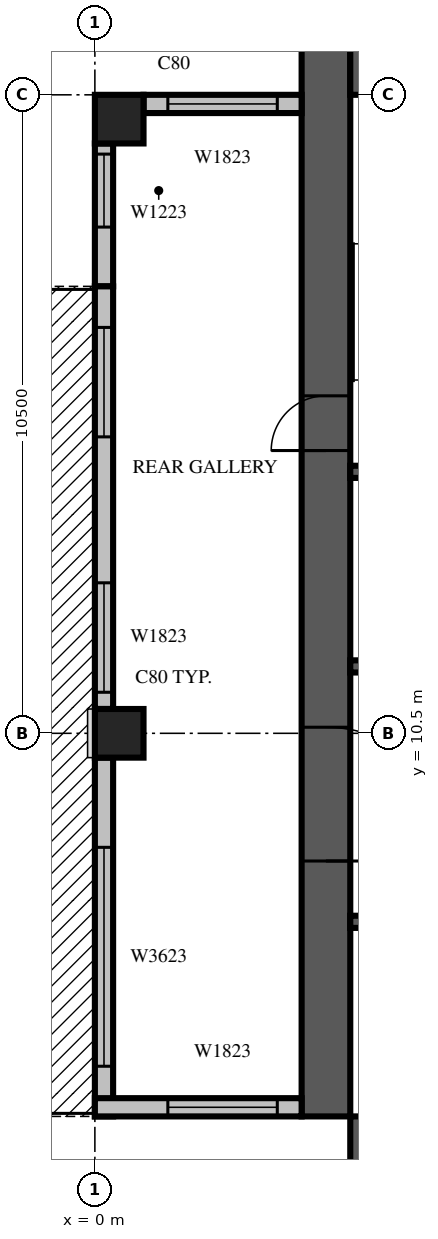
"""IFC4 building model, lengths in metres.
Left out: names, types, materials, properties, quantities, classifications, styles, units other than length and angle.
Written with IfcOpenShell. Run it as: python <this file> out.ifc"""

import sys

from ifc_helpers import new_model, si_unit, direction, frame, frame_2d, origin, origin_2d, place, context, subcontext, project, spatial, rectangle, extrude, source, transform, mapped, element, fill, save


model = new_model("IFC4")
c1 = context("Model", 3, precision=1e-05, world=origin(), true_north=direction((0.0, 1.0)))
c2 = subcontext(c1, "Body", "Model", "MODEL_VIEW")
j1 = project(units=[si_unit("LENGTHUNIT", "METRE"), si_unit("PLANEANGLEUNIT", "RADIAN")], contexts=[c1])
p1 = place(None, origin())
s1 = spatial("IfcSite", under=j1, at=p1, CompositionType="ELEMENT")
p2 = place(p1, origin())
s2 = spatial("IfcBuilding", under=s1, at=p2, CompositionType="ELEMENT")
p3 = place(p2, frame((0.0, 0.0, 231.0)))
s3 = spatial("IfcBuildingStorey", under=s2, at=p3, CompositionType="ELEMENT", Elevation=231.0)
m1 = source(origin(), c2, "Body", "SweptSolid", [
    extrude(rectangle(XDim=0.8, YDim=0.8, at=origin_2d()), origin(), (0.0, 0.0, 1.0), 3.8),
])
for number, where, z_axis, x_axis in (
    (1, (0.4, 10.5, 0.0), (0.0, 0.0, 1.0), (1.0, 0.0, 0.0)),
    (2, (0.4, 20.6, 0.0), (0.0, 0.0, 1.0), (1.0, 0.0, 0.0)),
):
    element("IfcColumn", number, at=place(p3, frame(where, z_axis=z_axis, x_axis=x_axis)), inside=s3, PredefinedType="COLUMN", context=c2, shape_type="MappedRepresentation", body=[
        mapped(m1, transform((0.0, 0.0, 0.0), scale=1.0)),
    ])
m2 = source(origin(), c2, "Body", "SweptSolid", [
    extrude(rectangle(XDim=17.6, YDim=0.8, at=frame_2d((8.8, 0.0))), origin(), (0.0, 0.0, 1.0), 3.8),
])
p4 = place(p3, frame((3.8, 4.2, 0.0), z_axis=(0.0, 0.0, 1.0), x_axis=(0.0, 1.0, 0.0)))
e3 = element("IfcWall", 3, at=p4, inside=s3, PredefinedType="SHEAR", context=c2, shape_type="MappedRepresentation", body=[
    mapped(m2, transform((0.0, 0.0, 0.0), scale=1.0)),
])
m3 = source(origin(), c2, "Body", "SweptSolid", [
    extrude(rectangle(XDim=2.2, YDim=2.1, at=frame_2d((1.1, 1.05))), frame((0.0, 0.41, 0.0), z_axis=(0.0, -1.0, 0.0), x_axis=(1.0, 0.0, 0.0)), (0.0, 0.0, 1.0), 0.82),
])
p5 = place(p4, frame((4.2, 0.0, 0.0)))
e4 = element("IfcOpeningElement", 4, at=p5, cuts=e3, PredefinedType="OPENING", context=c2, shape_type="MappedRepresentation", body=[
    mapped(m3, transform((0.0, 0.0, 0.0), scale=1.0)),
])
m4 = source(origin(), c2, "Body", "SweptSolid", [
    extrude(rectangle(XDim=0.9, YDim=2.1, at=frame_2d((0.45, 1.05))), frame((0.0, 0.41, 0.0), z_axis=(0.0, -1.0, 0.0), x_axis=(1.0, 0.0, 0.0)), (0.0, 0.0, 1.0), 0.82),
])
p6 = place(p4, frame((10.95, 0.0, 0.0)))
e5 = element("IfcOpeningElement", 5, at=p6, cuts=e3, PredefinedType="OPENING", context=c2, shape_type="MappedRepresentation", body=[
    mapped(m4, transform((0.0, 0.0, 0.0), scale=1.0)),
])
p7 = place(p3, frame((4.2, 3.8, 0.0), z_axis=(0.0, 0.0, 1.0), x_axis=(1.0, 0.0, 0.0)))
e6 = element("IfcWall", 6, at=p7, inside=s3, PredefinedType="SHEAR", context=c2, shape_type="MappedRepresentation", body=[
    mapped(m2, transform((0.0, 0.0, 0.0), scale=1.0)),
])
p8 = place(p7, frame((11.55, 0.0, 0.0)))
e7 = element("IfcOpeningElement", 7, at=p8, cuts=e6, PredefinedType="OPENING", context=c2, shape_type="MappedRepresentation", body=[
    mapped(m4, transform((0.0, 0.0, 0.0), scale=1.0)),
])
m5 = source(origin(), c2, "Body", "SweptSolid", [
    extrude(rectangle(XDim=16.8, YDim=0.8, at=frame_2d((8.4, 0.0))), origin(), (0.0, 0.0, 1.0), 3.8),
])
p9 = place(p3, frame((4.2, 21.4, 0.0), z_axis=(0.0, 0.0, 1.0), x_axis=(1.0, 0.0, 0.0)))
e8 = element("IfcWall", 8, at=p9, inside=s3, PredefinedType="SHEAR", context=c2, shape_type="MappedRepresentation", body=[
    mapped(m5, transform((0.0, 0.0, 0.0), scale=1.0)),
])
m6 = source(origin(), c2, "Body", "SweptSolid", [
    extrude(rectangle(XDim=1.2, YDim=2.1, at=frame_2d((0.6, 1.05))), frame((0.0, 0.41, 0.0), z_axis=(0.0, -1.0, 0.0), x_axis=(1.0, 0.0, 0.0)), (0.0, 0.0, 1.0), 0.82),
])
p10 = place(p9, frame((7.4, 0.0, 0.0)))
e9 = element("IfcOpeningElement", 9, at=p10, cuts=e8, PredefinedType="OPENING", context=c2, shape_type="MappedRepresentation", body=[
    mapped(m6, transform((0.0, 0.0, 0.0), scale=1.0)),
])
m7 = source(origin(), c2, "Body", "SweptSolid", [
    extrude(rectangle(XDim=2.6, YDim=0.3, at=frame_2d((1.3, 0.0))), origin(), (0.0, 0.0, 1.0), 3.4),
])
p11 = place(p3, frame((3.4, 20.85, 0.0), z_axis=(0.0, 0.0, 1.0), x_axis=(-1.0, 0.0, 0.0)))
e10 = element("IfcWall", 10, at=p11, inside=s3, PredefinedType="STANDARD", context=c2, shape_type="MappedRepresentation", body=[
    mapped(m7, transform((0.0, 0.0, 0.0), scale=1.0)),
])
m8 = source(origin(), c2, "Body", "SweptSolid", [
    extrude(rectangle(XDim=1.8, YDim=2.3, at=frame_2d((0.9, 1.15))), frame((0.0, 0.16, 0.0), z_axis=(0.0, -1.0, 0.0), x_axis=(1.0, 0.0, 0.0)), (0.0, 0.0, 1.0), 0.32),
])
p12 = place(p11, frame((0.4, 0.0, 0.6)))
e11 = element("IfcOpeningElement", 11, at=p12, cuts=e10, PredefinedType="OPENING", context=c2, shape_type="MappedRepresentation", body=[
    mapped(m8, transform((0.0, 0.0, 0.0), scale=1.0)),
])
p13 = place(p3, frame((0.15, 20.2, 0.0), z_axis=(0.0, 0.0, 1.0), x_axis=(0.0, -1.0, 0.0)))
e12 = element("IfcWall", 12, at=p13, inside=s3, PredefinedType="STANDARD", context=c2, shape_type="SweptSolid", body=[
    extrude(rectangle(XDim=2.35, YDim=0.3, at=frame_2d((1.175, 0.0))), origin(), (0.0, 0.0, 1.0), 3.4),
])
m9 = source(origin(), c2, "Body", "SweptSolid", [
    extrude(rectangle(XDim=1.2, YDim=2.3, at=frame_2d((0.6, 1.15))), frame((0.0, 0.16, 0.0), z_axis=(0.0, -1.0, 0.0), x_axis=(1.0, 0.0, 0.0)), (0.0, 0.0, 1.0), 0.32),
])
p14 = place(p13, frame((0.175, 0.0, 0.6)))
e13 = element("IfcOpeningElement", 13, at=p14, cuts=e12, PredefinedType="OPENING", context=c2, shape_type="MappedRepresentation", body=[
    mapped(m9, transform((0.0, 0.0, 0.0), scale=1.0)),
])
p15 = place(p3, frame((0.15, 17.85, 0.0), z_axis=(0.0, 0.0, 1.0), x_axis=(0.0, -1.0, 0.0)))
e14 = element("IfcWall", 14, at=p15, inside=s3, PredefinedType="STANDARD", context=c2, shape_type="SweptSolid", body=[
    extrude(rectangle(XDim=6.95, YDim=0.3, at=frame_2d((3.475, 0.0))), origin(), (0.0, 0.0, 1.0), 3.4),
])
m10 = source(origin(), c2, "Body", "SweptSolid", [
    extrude(rectangle(XDim=1.8, YDim=2.4, at=frame_2d((0.9, 1.2))), frame((0.0, 0.16, 0.0), z_axis=(0.0, -1.0, 0.0), x_axis=(1.0, 0.0, 0.0)), (0.0, 0.0, 1.0), 0.32),
])
p16 = place(p15, frame((0.675, 0.0, 0.0)))
e15 = element("IfcOpeningElement", 15, at=p16, cuts=e14, PredefinedType="OPENING", context=c2, shape_type="MappedRepresentation", body=[
    mapped(m10, transform((0.0, 0.0, 0.0), scale=1.0)),
])
p17 = place(p15, frame((4.875, 0.0, 0.6)))
e16 = element("IfcOpeningElement", 16, at=p17, cuts=e14, PredefinedType="OPENING", context=c2, shape_type="MappedRepresentation", body=[
    mapped(m8, transform((0.0, 0.0, 0.0), scale=1.0)),
])
m11 = source(origin(), c2, "Body", "SweptSolid", [
    extrude(rectangle(XDim=5.9, YDim=0.3, at=frame_2d((2.95, 0.0))), origin(), (0.0, 0.0, 1.0), 3.4),
])
p18 = place(p3, frame((0.15, 10.1, 0.0), z_axis=(0.0, 0.0, 1.0), x_axis=(0.0, -1.0, 0.0)))
e17 = element("IfcWall", 17, at=p18, inside=s3, PredefinedType="STANDARD", context=c2, shape_type="MappedRepresentation", body=[
    mapped(m11, transform((0.0, 0.0, 0.0), scale=1.0)),
])
m12 = source(origin(), c2, "Body", "SweptSolid", [
    extrude(rectangle(XDim=3.6, YDim=2.3, at=frame_2d((1.8, 1.15))), frame((0.0, 0.16, 0.0), z_axis=(0.0, -1.0, 0.0), x_axis=(1.0, 0.0, 0.0)), (0.0, 0.0, 1.0), 0.32),
])
p19 = place(p18, frame((1.475, 0.0, 0.6)))
e18 = element("IfcOpeningElement", 18, at=p19, cuts=e17, PredefinedType="OPENING", context=c2, shape_type="MappedRepresentation", body=[
    mapped(m12, transform((0.0, 0.0, 0.0), scale=1.0)),
])
m13 = source(origin(), c2, "Body", "SweptSolid", [
    extrude(rectangle(XDim=3.4, YDim=0.3, at=frame_2d((1.7, 0.0))), origin(), (0.0, 0.0, 1.0), 3.4),
])
p20 = place(p3, frame((0.0, 4.35, 0.0), z_axis=(0.0, 0.0, 1.0), x_axis=(1.0, 0.0, 0.0)))
e19 = element("IfcWall", 19, at=p20, inside=s3, PredefinedType="STANDARD", context=c2, shape_type="MappedRepresentation", body=[
    mapped(m13, transform((0.0, 0.0, 0.0), scale=1.0)),
])
p21 = place(p20, frame((1.2, 0.0, 0.6)))
e20 = element("IfcOpeningElement", 20, at=p21, cuts=e19, PredefinedType="OPENING", context=c2, shape_type="MappedRepresentation", body=[
    mapped(m8, transform((0.0, 0.0, 0.0), scale=1.0)),
])
m14 = source(origin(), c2, "Body", "SweptSolid", [
    extrude(rectangle(XDim=9.6, YDim=0.2, at=frame_2d((4.8, 0.0))), origin(), (0.0, 0.0, 1.0), 3.8),
])
p22 = place(p3, frame((4.2, 7.4, 0.0), z_axis=(0.0, 0.0, 1.0), x_axis=(1.0, 0.0, 0.0)))
e21 = element("IfcWall", 21, at=p22, inside=s3, PredefinedType="SOLIDWALL", context=c2, shape_type="MappedRepresentation", body=[
    mapped(m14, transform((0.0, 0.0, 0.0), scale=1.0)),
])
m15 = source(origin(), c2, "Body", "SweptSolid", [
    extrude(rectangle(XDim=1.1, YDim=2.1, at=frame_2d((0.55, 1.05))), frame((0.0, 0.11, 0.0), z_axis=(0.0, -1.0, 0.0), x_axis=(1.0, 0.0, 0.0)), (0.0, 0.0, 1.0), 0.22),
])
p23 = place(p22, frame((0.65, 0.0, 0.0)))
e22 = element("IfcOpeningElement", 22, at=p23, cuts=e21, PredefinedType="OPENING", context=c2, shape_type="MappedRepresentation", body=[
    mapped(m15, transform((0.0, 0.0, 0.0), scale=1.0)),
])
p24 = place(p22, frame((3.05, 0.0, 0.0)))
e23 = element("IfcOpeningElement", 23, at=p24, cuts=e21, PredefinedType="OPENING", context=c2, shape_type="MappedRepresentation", body=[
    mapped(m15, transform((0.0, 0.0, 0.0), scale=1.0)),
])
p25 = place(p22, frame((5.45, 0.0, 0.0)))
e24 = element("IfcOpeningElement", 24, at=p25, cuts=e21, PredefinedType="OPENING", context=c2, shape_type="MappedRepresentation", body=[
    mapped(m15, transform((0.0, 0.0, 0.0), scale=1.0)),
])
p26 = place(p22, frame((7.85, 0.0, 0.0)))
e25 = element("IfcOpeningElement", 25, at=p26, cuts=e21, PredefinedType="OPENING", context=c2, shape_type="MappedRepresentation", body=[
    mapped(m15, transform((0.0, 0.0, 0.0), scale=1.0)),
])
m16 = source(origin(), c2, "Body", "SweptSolid", [
    extrude(rectangle(XDim=4.8, YDim=0.2, at=frame_2d((2.4, 0.0))), origin(), (0.0, 0.0, 1.0), 3.8),
])
p27 = place(p3, frame((4.2, 11.6, 0.0), z_axis=(0.0, 0.0, 1.0), x_axis=(1.0, 0.0, 0.0)))
e26 = element("IfcWall", 26, at=p27, inside=s3, PredefinedType="SOLIDWALL", context=c2, shape_type="MappedRepresentation", body=[
    mapped(m16, transform((0.0, 0.0, 0.0), scale=1.0)),
])
p28 = place(p27, frame((0.65, 0.0, 0.0)))
e27 = element("IfcOpeningElement", 27, at=p28, cuts=e26, PredefinedType="OPENING", context=c2, shape_type="MappedRepresentation", body=[
    mapped(m15, transform((0.0, 0.0, 0.0), scale=1.0)),
])
p29 = place(p27, frame((3.05, 0.0, 0.0)))
e28 = element("IfcOpeningElement", 28, at=p29, cuts=e26, PredefinedType="OPENING", context=c2, shape_type="MappedRepresentation", body=[
    mapped(m15, transform((0.0, 0.0, 0.0), scale=1.0)),
])
p30 = place(p3, frame((4.2, 14.8, 0.0), z_axis=(0.0, 0.0, 1.0), x_axis=(1.0, 0.0, 0.0)))
e29 = element("IfcWall", 29, at=p30, inside=s3, PredefinedType="SOLIDWALL", context=c2, shape_type="MappedRepresentation", body=[
    mapped(m16, transform((0.0, 0.0, 0.0), scale=1.0)),
])
m17 = source(origin(), c2, "Body", "SweptSolid", [
    extrude(rectangle(XDim=1.8, YDim=2.3, at=frame_2d((0.9, 1.15))), frame((0.0, 0.03, 0.0), z_axis=(0.0, -1.0, 0.0), x_axis=(1.0, 0.0, 0.0)), (0.0, 0.0, 1.0), 0.06),
])
p31 = place(p12, origin())
e30 = element("IfcWindow", 30, at=p31, inside=s3, PartitioningType="SINGLE_PANEL", PredefinedType="WINDOW", context=c2, shape_type="MappedRepresentation", body=[
    mapped(m17, transform((0.0, 0.0, 0.0), scale=1.0)),
])
fill(e11, e30)
m18 = source(origin(), c2, "Body", "SweptSolid", [
    extrude(rectangle(XDim=1.2, YDim=2.3, at=frame_2d((0.6, 1.15))), frame((0.0, 0.03, 0.0), z_axis=(0.0, -1.0, 0.0), x_axis=(1.0, 0.0, 0.0)), (0.0, 0.0, 1.0), 0.06),
])
p32 = place(p14, origin())
e31 = element("IfcWindow", 31, at=p32, inside=s3, PartitioningType="SINGLE_PANEL", PredefinedType="WINDOW", context=c2, shape_type="MappedRepresentation", body=[
    mapped(m18, transform((0.0, 0.0, 0.0), scale=1.0)),
])
fill(e13, e31)
m19 = source(origin(), c2, "Body", "SweptSolid", [
    extrude(rectangle(XDim=1.8, YDim=2.4, at=frame_2d((0.9, 1.2))), frame((0.0, 0.025, 0.0), z_axis=(0.0, -1.0, 0.0), x_axis=(1.0, 0.0, 0.0)), (0.0, 0.0, 1.0), 0.05),
])
p33 = place(p16, origin())
e32 = element("IfcDoor", 32, at=p33, inside=s3, OperationType="SLIDING_TO_LEFT", PredefinedType="DOOR", context=c2, shape_type="MappedRepresentation", body=[
    mapped(m19, transform((0.0, 0.0, 0.0), scale=1.0)),
])
fill(e15, e32)
p34 = place(p17, origin())
e33 = element("IfcWindow", 33, at=p34, inside=s3, PartitioningType="SINGLE_PANEL", PredefinedType="WINDOW", context=c2, shape_type="MappedRepresentation", body=[
    mapped(m17, transform((0.0, 0.0, 0.0), scale=1.0)),
])
fill(e16, e33)
m20 = source(origin(), c2, "Body", "SweptSolid", [
    extrude(rectangle(XDim=3.6, YDim=2.3, at=frame_2d((1.8, 1.15))), frame((0.0, 0.03, 0.0), z_axis=(0.0, -1.0, 0.0), x_axis=(1.0, 0.0, 0.0)), (0.0, 0.0, 1.0), 0.06),
])
p35 = place(p19, origin())
e34 = element("IfcWindow", 34, at=p35, inside=s3, PartitioningType="SINGLE_PANEL", PredefinedType="WINDOW", context=c2, shape_type="MappedRepresentation", body=[
    mapped(m20, transform((0.0, 0.0, 0.0), scale=1.0)),
])
fill(e18, e34)
p36 = place(p21, origin())
e35 = element("IfcWindow", 35, at=p36, inside=s3, PartitioningType="SINGLE_PANEL", PredefinedType="WINDOW", context=c2, shape_type="MappedRepresentation", body=[
    mapped(m17, transform((0.0, 0.0, 0.0), scale=1.0)),
])
fill(e20, e35)
m21 = source(origin(), c2, "Body", "SweptSolid", [
    extrude(rectangle(XDim=2.2, YDim=2.1, at=frame_2d((1.1, 1.05))), frame((0.0, 0.025, 0.0), z_axis=(0.0, -1.0, 0.0), x_axis=(1.0, 0.0, 0.0)), (0.0, 0.0, 1.0), 0.05),
])
p37 = place(p5, origin())
e36 = element("IfcDoor", 36, at=p37, inside=s3, OperationType="DOUBLE_DOOR_SINGLE_SWING", PredefinedType="DOOR", context=c2, shape_type="MappedRepresentation", body=[
    mapped(m21, transform((0.0, 0.0, 0.0), scale=1.0)),
])
fill(e4, e36)
m22 = source(origin(), c2, "Body", "SweptSolid", [
    extrude(rectangle(XDim=0.9, YDim=2.1, at=frame_2d((0.45, 1.05))), frame((0.0, 0.025, 0.0), z_axis=(0.0, -1.0, 0.0), x_axis=(1.0, 0.0, 0.0)), (0.0, 0.0, 1.0), 0.05),
])
p38 = place(p6, origin())
e37 = element("IfcDoor", 37, at=p38, inside=s3, OperationType="SINGLE_SWING_LEFT", PredefinedType="DOOR", context=c2, shape_type="MappedRepresentation", body=[
    mapped(m22, transform((0.0, 0.0, 0.0), scale=1.0)),
])
fill(e5, e37)
save(model, sys.argv[1])
